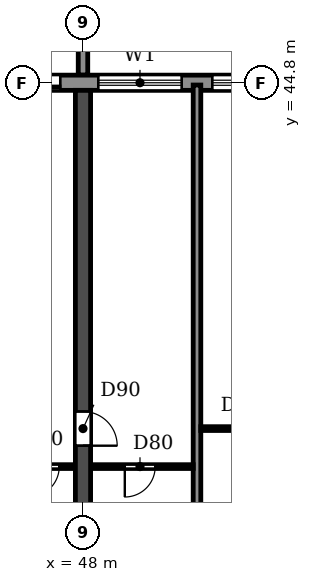
"""IFC4 building model, lengths in metres.
Left out: names, types, materials, properties, quantities, classifications, styles, units other than length and angle.
Written with IfcOpenShell. Run it as: python <this file> out.ifc"""

import sys

from ifc_helpers import new_model, si_unit, direction, frame, frame_2d, origin, place, context, subcontext, project, spatial, polyline, rectangle, outline, extrude, source, transform, mapped, element, fill, save


model = new_model("IFC4")
c1 = context("Model", 3, precision=1e-05, world=origin(), true_north=direction((0.0, 1.0)))
c2 = subcontext(c1, "Body", "Model", "MODEL_VIEW")
j1 = project(units=[si_unit("LENGTHUNIT", "METRE"), si_unit("PLANEANGLEUNIT", "RADIAN")], contexts=[c1])
p1 = place(None, origin())
s1 = spatial("IfcSite", under=j1, at=p1, CompositionType="ELEMENT")
p2 = place(p1, origin())
s2 = spatial("IfcBuilding", under=s1, at=p2, CompositionType="ELEMENT")
p3 = place(p2, frame((0.0, 0.0, 49.8)))
s3 = spatial("IfcBuildingStorey", under=s2, at=p3, CompositionType="ELEMENT", Elevation=49.8)
p4 = place(p3, frame((48.0, 30.55, 0.0), z_axis=(0.0, 0.0, 1.0), x_axis=(0.0, 1.0, 0.0)))
e1 = element("IfcWall", 1, at=p4, inside=s3, PredefinedType="SHEAR", context=c2, shape_type="SweptSolid", body=[
    extrude(rectangle(XDim=14.05, YDim=0.4, at=frame_2d((7.025, 0.0))), origin(), (0.0, 0.0, 1.0), 3.0),
])
p5 = place(p4, frame((4.7, 0.0, 0.0)))
e2 = element("IfcOpeningElement", 2, at=p5, cuts=e1, PredefinedType="OPENING", context=c2, shape_type="SweptSolid", body=[
    extrude(rectangle(XDim=0.9, YDim=2.1, at=frame_2d((0.45, 1.05))), frame((0.0, 0.21, 0.0), z_axis=(0.0, -1.0, 0.0), x_axis=(1.0, 0.0, 0.0)), (0.0, 0.0, 1.0), 0.42),
])
p6 = place(p3, frame((97.317, 44.8, 0.0), z_axis=(0.0, 0.0, 1.0), x_axis=(-1.0, 0.0, 0.0)))
e3 = element("IfcWall", 3, at=p6, inside=s3, PredefinedType="STANDARD", context=c2, shape_type="SweptSolid", body=[
    extrude(rectangle(XDim=92.634, YDim=0.4, at=frame_2d((46.317, 0.0))), origin(), (0.0, 0.0, 1.0), 3.0),
])
p7 = place(p6, frame((88.917, 0.0, 0.0)))
e4 = element("IfcOpeningElement", 4, at=p7, cuts=e3, PredefinedType="OPENING", context=c2, shape_type="SweptSolid", body=[
    extrude(rectangle(XDim=1.8, YDim=2.4, at=frame_2d((0.9, 1.2))), frame((0.0, 0.21, 0.0), z_axis=(0.0, -1.0, 0.0), x_axis=(1.0, 0.0, 0.0)), (0.0, 0.0, 1.0), 0.42),
])
p8 = place(p6, frame((85.717, 0.0, 0.9)))
e5 = element("IfcOpeningElement", 5, at=p8, cuts=e3, PredefinedType="OPENING", context=c2, shape_type="SweptSolid", body=[
    extrude(rectangle(XDim=2.2, YDim=1.5, at=frame_2d((1.1, 0.75))), frame((0.0, 0.21, 0.0), z_axis=(0.0, -1.0, 0.0), x_axis=(1.0, 0.0, 0.0)), (0.0, 0.0, 1.0), 0.42),
])
p9 = place(p6, frame((82.717, 0.0, 0.9)))
e6 = element("IfcOpeningElement", 6, at=p9, cuts=e3, PredefinedType="OPENING", context=c2, shape_type="SweptSolid", body=[
    extrude(rectangle(XDim=2.2, YDim=1.5, at=frame_2d((1.1, 0.75))), frame((0.0, 0.21, 0.0), z_axis=(0.0, -1.0, 0.0), x_axis=(1.0, 0.0, 0.0)), (0.0, 0.0, 1.0), 0.42),
])
p10 = place(p6, frame((79.717, 0.0, 0.9)))
e7 = element("IfcOpeningElement", 7, at=p10, cuts=e3, PredefinedType="OPENING", context=c2, shape_type="SweptSolid", body=[
    extrude(rectangle(XDim=2.2, YDim=1.5, at=frame_2d((1.1, 0.75))), frame((0.0, 0.21, 0.0), z_axis=(0.0, -1.0, 0.0), x_axis=(1.0, 0.0, 0.0)), (0.0, 0.0, 1.0), 0.42),
])
p11 = place(p6, frame((76.717, 0.0, 0.9)))
e8 = element("IfcOpeningElement", 8, at=p11, cuts=e3, PredefinedType="OPENING", context=c2, shape_type="SweptSolid", body=[
    extrude(rectangle(XDim=2.2, YDim=1.5, at=frame_2d((1.1, 0.75))), frame((0.0, 0.21, 0.0), z_axis=(0.0, -1.0, 0.0), x_axis=(1.0, 0.0, 0.0)), (0.0, 0.0, 1.0), 0.42),
])
p12 = place(p6, frame((73.917, 0.0, 0.0)))
e9 = element("IfcOpeningElement", 9, at=p12, cuts=e3, PredefinedType="OPENING", context=c2, shape_type="SweptSolid", body=[
    extrude(rectangle(XDim=1.8, YDim=2.4, at=frame_2d((0.9, 1.2))), frame((0.0, 0.21, 0.0), z_axis=(0.0, -1.0, 0.0), x_axis=(1.0, 0.0, 0.0)), (0.0, 0.0, 1.0), 0.42),
])
p13 = place(p6, frame((70.717, 0.0, 0.9)))
e10 = element("IfcOpeningElement", 10, at=p13, cuts=e3, PredefinedType="OPENING", context=c2, shape_type="SweptSolid", body=[
    extrude(rectangle(XDim=2.2, YDim=1.5, at=frame_2d((1.1, 0.75))), frame((0.0, 0.21, 0.0), z_axis=(0.0, -1.0, 0.0), x_axis=(1.0, 0.0, 0.0)), (0.0, 0.0, 1.0), 0.42),
])
p14 = place(p6, frame((67.717, 0.0, 0.9)))
e11 = element("IfcOpeningElement", 11, at=p14, cuts=e3, PredefinedType="OPENING", context=c2, shape_type="SweptSolid", body=[
    extrude(rectangle(XDim=2.2, YDim=1.5, at=frame_2d((1.1, 0.75))), frame((0.0, 0.21, 0.0), z_axis=(0.0, -1.0, 0.0), x_axis=(1.0, 0.0, 0.0)), (0.0, 0.0, 1.0), 0.42),
])
p15 = place(p6, frame((64.717, 0.0, 0.9)))
e12 = element("IfcOpeningElement", 12, at=p15, cuts=e3, PredefinedType="OPENING", context=c2, shape_type="SweptSolid", body=[
    extrude(rectangle(XDim=2.2, YDim=1.5, at=frame_2d((1.1, 0.75))), frame((0.0, 0.21, 0.0), z_axis=(0.0, -1.0, 0.0), x_axis=(1.0, 0.0, 0.0)), (0.0, 0.0, 1.0), 0.42),
])
p16 = place(p6, frame((61.917, 0.0, 0.0)))
e13 = element("IfcOpeningElement", 13, at=p16, cuts=e3, PredefinedType="OPENING", context=c2, shape_type="SweptSolid", body=[
    extrude(rectangle(XDim=1.8, YDim=2.4, at=frame_2d((0.9, 1.2))), frame((0.0, 0.21, 0.0), z_axis=(0.0, -1.0, 0.0), x_axis=(1.0, 0.0, 0.0)), (0.0, 0.0, 1.0), 0.42),
])
p17 = place(p6, frame((58.717, 0.0, 0.9)))
e14 = element("IfcOpeningElement", 14, at=p17, cuts=e3, PredefinedType="OPENING", context=c2, shape_type="SweptSolid", body=[
    extrude(rectangle(XDim=2.2, YDim=1.5, at=frame_2d((1.1, 0.75))), frame((0.0, 0.21, 0.0), z_axis=(0.0, -1.0, 0.0), x_axis=(1.0, 0.0, 0.0)), (0.0, 0.0, 1.0), 0.42),
])
p18 = place(p6, frame((55.717, 0.0, 0.9)))
e15 = element("IfcOpeningElement", 15, at=p18, cuts=e3, PredefinedType="OPENING", context=c2, shape_type="SweptSolid", body=[
    extrude(rectangle(XDim=2.2, YDim=1.5, at=frame_2d((1.1, 0.75))), frame((0.0, 0.21, 0.0), z_axis=(0.0, -1.0, 0.0), x_axis=(1.0, 0.0, 0.0)), (0.0, 0.0, 1.0), 0.42),
])
p19 = place(p6, frame((52.717, 0.0, 0.9)))
e16 = element("IfcOpeningElement", 16, at=p19, cuts=e3, PredefinedType="OPENING", context=c2, shape_type="SweptSolid", body=[
    extrude(rectangle(XDim=2.2, YDim=1.5, at=frame_2d((1.1, 0.75))), frame((0.0, 0.21, 0.0), z_axis=(0.0, -1.0, 0.0), x_axis=(1.0, 0.0, 0.0)), (0.0, 0.0, 1.0), 0.42),
])
p20 = place(p6, frame((49.917, 0.0, 0.0)))
e17 = element("IfcOpeningElement", 17, at=p20, cuts=e3, PredefinedType="OPENING", context=c2, shape_type="SweptSolid", body=[
    extrude(rectangle(XDim=1.8, YDim=2.4, at=frame_2d((0.9, 1.2))), frame((0.0, 0.21, 0.0), z_axis=(0.0, -1.0, 0.0), x_axis=(1.0, 0.0, 0.0)), (0.0, 0.0, 1.0), 0.42),
])
p21 = place(p6, frame((46.717, 0.0, 0.9)))
e18 = element("IfcOpeningElement", 18, at=p21, cuts=e3, PredefinedType="OPENING", context=c2, shape_type="SweptSolid", body=[
    extrude(rectangle(XDim=2.2, YDim=1.5, at=frame_2d((1.1, 0.75))), frame((0.0, 0.21, 0.0), z_axis=(0.0, -1.0, 0.0), x_axis=(1.0, 0.0, 0.0)), (0.0, 0.0, 1.0), 0.42),
])
p22 = place(p6, frame((43.717, 0.0, 0.9)))
e19 = element("IfcOpeningElement", 19, at=p22, cuts=e3, PredefinedType="OPENING", context=c2, shape_type="SweptSolid", body=[
    extrude(rectangle(XDim=2.2, YDim=1.5, at=frame_2d((1.1, 0.75))), frame((0.0, 0.21, 0.0), z_axis=(0.0, -1.0, 0.0), x_axis=(1.0, 0.0, 0.0)), (0.0, 0.0, 1.0), 0.42),
])
p23 = place(p6, frame((40.717, 0.0, 0.9)))
e20 = element("IfcOpeningElement", 20, at=p23, cuts=e3, PredefinedType="OPENING", context=c2, shape_type="SweptSolid", body=[
    extrude(rectangle(XDim=2.2, YDim=1.5, at=frame_2d((1.1, 0.75))), frame((0.0, 0.21, 0.0), z_axis=(0.0, -1.0, 0.0), x_axis=(1.0, 0.0, 0.0)), (0.0, 0.0, 1.0), 0.42),
])
p24 = place(p6, frame((37.917, 0.0, 0.0)))
e21 = element("IfcOpeningElement", 21, at=p24, cuts=e3, PredefinedType="OPENING", context=c2, shape_type="SweptSolid", body=[
    extrude(rectangle(XDim=1.8, YDim=2.4, at=frame_2d((0.9, 1.2))), frame((0.0, 0.21, 0.0), z_axis=(0.0, -1.0, 0.0), x_axis=(1.0, 0.0, 0.0)), (0.0, 0.0, 1.0), 0.42),
])
p25 = place(p6, frame((34.717, 0.0, 0.9)))
e22 = element("IfcOpeningElement", 22, at=p25, cuts=e3, PredefinedType="OPENING", context=c2, shape_type="SweptSolid", body=[
    extrude(rectangle(XDim=2.2, YDim=1.5, at=frame_2d((1.1, 0.75))), frame((0.0, 0.21, 0.0), z_axis=(0.0, -1.0, 0.0), x_axis=(1.0, 0.0, 0.0)), (0.0, 0.0, 1.0), 0.42),
])
p26 = place(p6, frame((31.717, 0.0, 0.9)))
e23 = element("IfcOpeningElement", 23, at=p26, cuts=e3, PredefinedType="OPENING", context=c2, shape_type="SweptSolid", body=[
    extrude(rectangle(XDim=2.2, YDim=1.5, at=frame_2d((1.1, 0.75))), frame((0.0, 0.21, 0.0), z_axis=(0.0, -1.0, 0.0), x_axis=(1.0, 0.0, 0.0)), (0.0, 0.0, 1.0), 0.42),
])
p27 = place(p6, frame((28.717, 0.0, 0.9)))
e24 = element("IfcOpeningElement", 24, at=p27, cuts=e3, PredefinedType="OPENING", context=c2, shape_type="SweptSolid", body=[
    extrude(rectangle(XDim=2.2, YDim=1.5, at=frame_2d((1.1, 0.75))), frame((0.0, 0.21, 0.0), z_axis=(0.0, -1.0, 0.0), x_axis=(1.0, 0.0, 0.0)), (0.0, 0.0, 1.0), 0.42),
])
p28 = place(p6, frame((25.917, 0.0, 0.0)))
e25 = element("IfcOpeningElement", 25, at=p28, cuts=e3, PredefinedType="OPENING", context=c2, shape_type="SweptSolid", body=[
    extrude(rectangle(XDim=1.8, YDim=2.4, at=frame_2d((0.9, 1.2))), frame((0.0, 0.21, 0.0), z_axis=(0.0, -1.0, 0.0), x_axis=(1.0, 0.0, 0.0)), (0.0, 0.0, 1.0), 0.42),
])
p29 = place(p6, frame((22.917, 0.0, 0.0)))
e26 = element("IfcOpeningElement", 26, at=p29, cuts=e3, PredefinedType="OPENING", context=c2, shape_type="SweptSolid", body=[
    extrude(rectangle(XDim=1.8, YDim=2.4, at=frame_2d((0.9, 1.2))), frame((0.0, 0.21, 0.0), z_axis=(0.0, -1.0, 0.0), x_axis=(1.0, 0.0, 0.0)), (0.0, 0.0, 1.0), 0.42),
])
p30 = place(p6, frame((19.717, 0.0, 0.9)))
e27 = element("IfcOpeningElement", 27, at=p30, cuts=e3, PredefinedType="OPENING", context=c2, shape_type="SweptSolid", body=[
    extrude(rectangle(XDim=2.2, YDim=1.5, at=frame_2d((1.1, 0.75))), frame((0.0, 0.21, 0.0), z_axis=(0.0, -1.0, 0.0), x_axis=(1.0, 0.0, 0.0)), (0.0, 0.0, 1.0), 0.42),
])
p31 = place(p6, frame((16.717, 0.0, 0.9)))
e28 = element("IfcOpeningElement", 28, at=p31, cuts=e3, PredefinedType="OPENING", context=c2, shape_type="SweptSolid", body=[
    extrude(rectangle(XDim=2.2, YDim=1.5, at=frame_2d((1.1, 0.75))), frame((0.0, 0.21, 0.0), z_axis=(0.0, -1.0, 0.0), x_axis=(1.0, 0.0, 0.0)), (0.0, 0.0, 1.0), 0.42),
])
p32 = place(p6, frame((13.717, 0.0, 0.9)))
e29 = element("IfcOpeningElement", 29, at=p32, cuts=e3, PredefinedType="OPENING", context=c2, shape_type="SweptSolid", body=[
    extrude(rectangle(XDim=2.2, YDim=1.5, at=frame_2d((1.1, 0.75))), frame((0.0, 0.21, 0.0), z_axis=(0.0, -1.0, 0.0), x_axis=(1.0, 0.0, 0.0)), (0.0, 0.0, 1.0), 0.42),
])
p33 = place(p6, frame((10.717, 0.0, 0.9)))
e30 = element("IfcOpeningElement", 30, at=p33, cuts=e3, PredefinedType="OPENING", context=c2, shape_type="SweptSolid", body=[
    extrude(rectangle(XDim=2.2, YDim=1.5, at=frame_2d((1.1, 0.75))), frame((0.0, 0.21, 0.0), z_axis=(0.0, -1.0, 0.0), x_axis=(1.0, 0.0, 0.0)), (0.0, 0.0, 1.0), 0.42),
])
p34 = place(p6, frame((7.917, 0.0, 0.0)))
e31 = element("IfcOpeningElement", 31, at=p34, cuts=e3, PredefinedType="OPENING", context=c2, shape_type="SweptSolid", body=[
    extrude(rectangle(XDim=1.8, YDim=2.4, at=frame_2d((0.9, 1.2))), frame((0.0, 0.21, 0.0), z_axis=(0.0, -1.0, 0.0), x_axis=(1.0, 0.0, 0.0)), (0.0, 0.0, 1.0), 0.42),
])
p35 = place(p6, frame((4.717, 0.0, 0.9)))
e32 = element("IfcOpeningElement", 32, at=p35, cuts=e3, PredefinedType="OPENING", context=c2, shape_type="SweptSolid", body=[
    extrude(rectangle(XDim=2.2, YDim=1.5, at=frame_2d((1.1, 0.75))), frame((0.0, 0.21, 0.0), z_axis=(0.0, -1.0, 0.0), x_axis=(1.0, 0.0, 0.0)), (0.0, 0.0, 1.0), 0.42),
])
p36 = place(p6, frame((1.917, 0.0, 0.0)))
e33 = element("IfcOpeningElement", 33, at=p36, cuts=e3, PredefinedType="OPENING", context=c2, shape_type="SweptSolid", body=[
    extrude(rectangle(XDim=1.8, YDim=2.4, at=frame_2d((0.9, 1.2))), frame((0.0, 0.21, 0.0), z_axis=(0.0, -1.0, 0.0), x_axis=(1.0, 0.0, 0.0)), (0.0, 0.0, 1.0), 0.42),
])
m1 = source(origin(), c2, "Body", "SweptSolid", [
    extrude(outline(polyline([(0.0, 0.0), (0.25, 0.0), (0.25, 3.1), (0.0, 3.1), (0.0, 0.0)])), origin(), (0.0, 0.0, 1.0), 3.1),
])
p37 = place(p3, frame((47.875, 45.0, 0.0)))
e34 = element("IfcWall", 34, at=p37, inside=s3, PredefinedType="STANDARD", context=c2, shape_type="MappedRepresentation", body=[
    mapped(m1, transform((0.0, 0.0, 0.0))),
])
p38 = place(p3, frame((51.0, 30.56, 0.0), z_axis=(0.0, 0.0, 1.0), x_axis=(0.0, 1.0, 0.0)))
e35 = element("IfcWall", 35, at=p38, inside=s3, PredefinedType="PARTITIONING", context=c2, shape_type="SweptSolid", body=[
    extrude(rectangle(XDim=14.18, YDim=0.2, at=frame_2d((7.09, 0.0))), origin(), (0.0, 0.0, 1.0), 3.0),
])
p39 = place(p3, frame((45.9, 34.7, 0.0), z_axis=(0.0, 0.0, 1.0), x_axis=(1.0, 0.0, 0.0)))
e36 = element("IfcWall", 36, at=p39, inside=s3, PredefinedType="PARTITIONING", context=c2, shape_type="SweptSolid", body=[
    extrude(rectangle(XDim=1.89, YDim=0.1, at=frame_2d((0.945, 0.0))), origin(), (0.0, 0.0, 1.0), 3.0),
])
p40 = place(p39, frame((0.675, 0.0, 0.0)))
e37 = element("IfcOpeningElement", 37, at=p40, cuts=e36, PredefinedType="OPENING", context=c2, shape_type="SweptSolid", body=[
    extrude(rectangle(XDim=0.8, YDim=2.1, at=frame_2d((0.4, 1.05))), frame((0.0, 0.06, 0.0), z_axis=(0.0, -1.0, 0.0), x_axis=(1.0, 0.0, 0.0)), (0.0, 0.0, 1.0), 0.12),
])
p41 = place(p3, frame((48.21, 34.7, 0.0), z_axis=(0.0, 0.0, 1.0), x_axis=(1.0, 0.0, 0.0)))
e38 = element("IfcWall", 38, at=p41, inside=s3, PredefinedType="PARTITIONING", context=c2, shape_type="SweptSolid", body=[
    extrude(rectangle(XDim=2.69, YDim=0.1, at=frame_2d((1.345, 0.0))), origin(), (0.0, 0.0, 1.0), 3.0),
])
p42 = place(p41, frame((0.89, 0.0, 0.0)))
e39 = element("IfcOpeningElement", 39, at=p42, cuts=e38, PredefinedType="OPENING", context=c2, shape_type="SweptSolid", body=[
    extrude(rectangle(XDim=0.8, YDim=2.1, at=frame_2d((0.4, 1.05))), frame((0.0, 0.06, 0.0), z_axis=(0.0, -1.0, 0.0), x_axis=(1.0, 0.0, 0.0)), (0.0, 0.0, 1.0), 0.12),
])
p43 = place(p3, frame((51.1, 35.7, 0.0), z_axis=(0.0, 0.0, 1.0), x_axis=(1.0, 0.0, 0.0)))
e40 = element("IfcWall", 40, at=p43, inside=s3, PredefinedType="PARTITIONING", context=c2, shape_type="SweptSolid", body=[
    extrude(rectangle(XDim=2.69, YDim=0.1, at=frame_2d((1.345, 0.0))), origin(), (0.0, 0.0, 1.0), 3.0),
])
p44 = place(p43, frame((1.0, 0.0, 0.0)))
e41 = element("IfcOpeningElement", 41, at=p44, cuts=e40, PredefinedType="OPENING", context=c2, shape_type="SweptSolid", body=[
    extrude(rectangle(XDim=0.8, YDim=2.1, at=frame_2d((0.4, 1.05))), frame((0.0, 0.06, 0.0), z_axis=(0.0, -1.0, 0.0), x_axis=(1.0, 0.0, 0.0)), (0.0, 0.0, 1.0), 0.12),
])
p45 = place(p20, origin())
e42 = element("IfcDoor", 42, at=p45, inside=s3, OperationType="DOUBLE_DOOR_SLIDING", PredefinedType="DOOR", context=c2, shape_type="SweptSolid", body=[
    extrude(rectangle(XDim=1.8, YDim=2.4, at=frame_2d((0.9, 1.2))), frame((0.0, 0.025, 0.0), z_axis=(0.0, -1.0, 0.0), x_axis=(1.0, 0.0, 0.0)), (0.0, 0.0, 1.0), 0.05),
])
fill(e17, e42)
p46 = place(p21, origin())
e43 = element("IfcWindow", 43, at=p46, inside=s3, PartitioningType="DOUBLE_PANEL_HORIZONTAL", PredefinedType="WINDOW", context=c2, shape_type="SweptSolid", body=[
    extrude(rectangle(XDim=2.2, YDim=1.5, at=frame_2d((1.1, 0.75))), frame((0.0, 0.03, 0.0), z_axis=(0.0, -1.0, 0.0), x_axis=(1.0, 0.0, 0.0)), (0.0, 0.0, 1.0), 0.06),
])
fill(e18, e43)
p47 = place(p22, origin())
e44 = element("IfcWindow", 44, at=p47, inside=s3, PartitioningType="DOUBLE_PANEL_HORIZONTAL", PredefinedType="WINDOW", context=c2, shape_type="SweptSolid", body=[
    extrude(rectangle(XDim=2.2, YDim=1.5, at=frame_2d((1.1, 0.75))), frame((0.0, 0.03, 0.0), z_axis=(0.0, -1.0, 0.0), x_axis=(1.0, 0.0, 0.0)), (0.0, 0.0, 1.0), 0.06),
])
fill(e19, e44)
p48 = place(p42, frame((0.8, 0.0, 0.0), z_axis=(0.0, 0.0, 1.0), x_axis=(-1.0, 0.0, 0.0)))
e45 = element("IfcDoor", 45, at=p48, inside=s3, OperationType="SINGLE_SWING_RIGHT", PredefinedType="DOOR", context=c2, shape_type="SweptSolid", body=[
    extrude(rectangle(XDim=0.8, YDim=2.1, at=frame_2d((0.4, 1.05))), frame((0.0, 0.025, 0.0), z_axis=(0.0, -1.0, 0.0), x_axis=(1.0, 0.0, 0.0)), (0.0, 0.0, 1.0), 0.05),
])
fill(e39, e45)
p49 = place(p40, frame((0.8, 0.0, 0.0), z_axis=(0.0, 0.0, 1.0), x_axis=(-1.0, 0.0, 0.0)))
e46 = element("IfcDoor", 46, at=p49, inside=s3, OperationType="SINGLE_SWING_RIGHT", PredefinedType="DOOR", context=c2, shape_type="SweptSolid", body=[
    extrude(rectangle(XDim=0.8, YDim=2.1, at=frame_2d((0.4, 1.05))), frame((0.0, 0.025, 0.0), z_axis=(0.0, -1.0, 0.0), x_axis=(1.0, 0.0, 0.0)), (0.0, 0.0, 1.0), 0.05),
])
fill(e37, e46)
p50 = place(p5, frame((0.9, 0.0, 0.0), z_axis=(0.0, 0.0, 1.0), x_axis=(-1.0, 0.0, 0.0)))
e47 = element("IfcDoor", 47, at=p50, inside=s3, OperationType="SINGLE_SWING_RIGHT", PredefinedType="DOOR", context=c2, shape_type="SweptSolid", body=[
    extrude(rectangle(XDim=0.9, YDim=2.1, at=frame_2d((0.45, 1.05))), frame((0.0, 0.025, 0.0), z_axis=(0.0, -1.0, 0.0), x_axis=(1.0, 0.0, 0.0)), (0.0, 0.0, 1.0), 0.05),
])
fill(e2, e47)
save(model, sys.argv[1])
